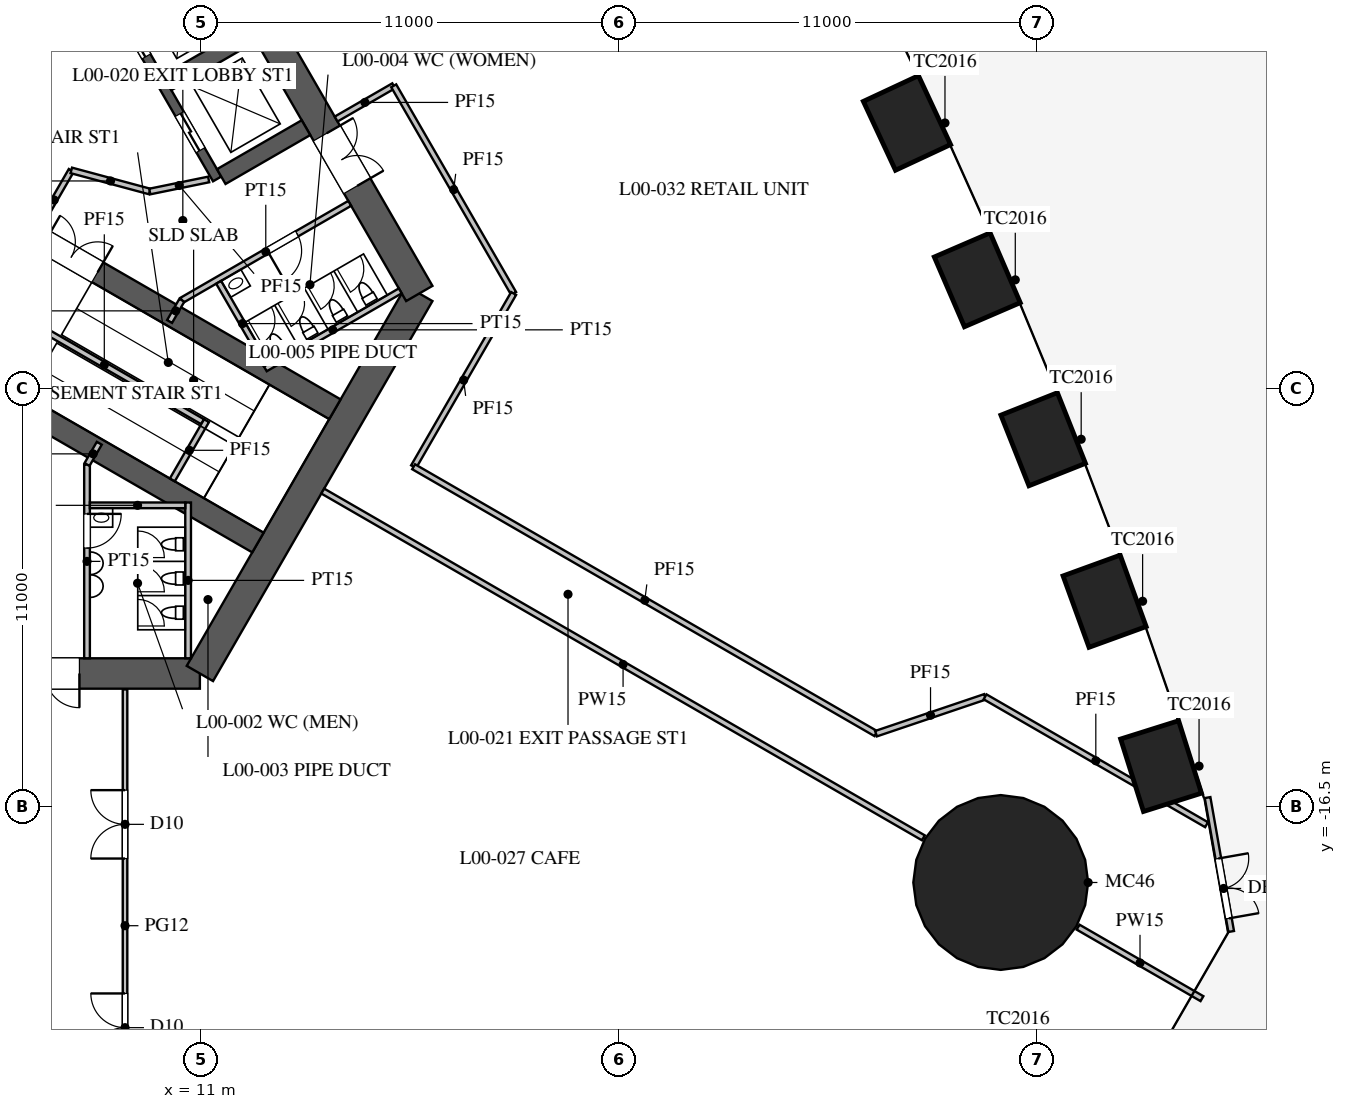
"""IFC4 building model, lengths in metres.
Left out: names, types, materials, properties, quantities, classifications, styles, units other than length and angle.
Written with IfcOpenShell. Run it as: python <this file> out.ifc"""

import sys

from ifc_helpers import new_model, si_unit, direction, frame, frame_2d, origin, origin_2d, place, context, subcontext, project, spatial, polyline, rectangle, circle, outline, extrude, element, fill, save


model = new_model("IFC4")
c1 = context("Model", 3, precision=1e-05, world=origin(), true_north=direction((0.0, 1.0)))
c2 = subcontext(c1, "Body", "Model", "MODEL_VIEW")
j1 = project(units=[si_unit("LENGTHUNIT", "METRE"), si_unit("PLANEANGLEUNIT", "RADIAN")], contexts=[c1])
p1 = place(None, origin())
s1 = spatial("IfcSite", under=j1, at=p1, CompositionType="ELEMENT")
p2 = place(p1, origin())
s2 = spatial("IfcBuilding", under=s1, at=p2, CompositionType="ELEMENT")
p3 = place(p2, origin())
s3 = spatial("IfcBuildingStorey", under=s2, at=p3, CompositionType="ELEMENT", Elevation=0.0)
for number, where, z_axis, x_axis in (
    (1, (36.262, -15.438, 0.0), (0.0, 0.0, 1.0), (-0.3, 0.954, 0.0)),
    (2, (34.776, -11.099, 0.0), (0.0, 0.0, 1.0), (-0.342, 0.94, 0.0)),
    (3, (33.16, -6.836, 0.0), (0.0, 0.0, 1.0), (-0.369, 0.929, 0.0)),
    (4, (31.426, -2.641, 0.0), (0.0, 0.0, 1.0), (-0.396, 0.918, 0.0)),
    (5, (29.576, 1.487, 0.0), (0.0, 0.0, 1.0), (-0.423, 0.906, 0.0)),
):
    element("IfcColumn", number, at=place(p3, frame(where, z_axis=z_axis, x_axis=x_axis)), inside=s3, PredefinedType="COLUMN", context=c2, shape_type="SweptSolid", body=[
        extrude(rectangle(XDim=2.0, YDim=1.6, at=origin_2d()), origin(), (0.0, 0.0, 1.0), 6.5),
    ])
p4 = place(p3, frame((32.043, -18.5, 0.0), z_axis=(0.0, 0.0, 1.0), x_axis=(1.0, 0.0, 0.0)))
e6 = element("IfcColumn", 6, at=p4, inside=s3, PredefinedType="COLUMN", context=c2, shape_type="SweptSolid", body=[
    extrude(circle(Radius=2.3, at=origin_2d()), origin(), (0.0, 0.0, 1.0), 6.5),
])
p5 = place(p3, frame((-10.97, -13.0, 0.0), z_axis=(0.0, 0.0, 1.0), x_axis=(1.0, 0.0, 0.0)))
e7 = element("IfcWall", 7, at=p5, inside=s3, PredefinedType="SHEAR", context=c2, shape_type="SweptSolid", body=[
    extrude(rectangle(XDim=21.939, YDim=0.8, at=frame_2d((10.97, 0.0))), origin(), (0.0, 0.0, 1.0), 6.5),
])
p6 = place(p5, frame((16.97, 0.0, 0.0)))
e8 = element("IfcOpeningElement", 8, at=p6, cuts=e7, PredefinedType="OPENING", context=c2, shape_type="SweptSolid", body=[
    extrude(rectangle(XDim=1.8, YDim=2.1, at=frame_2d((0.9, 1.05))), frame((0.0, 0.41, 0.0), z_axis=(0.0, -1.0, 0.0), x_axis=(1.0, 0.0, 0.0)), (0.0, 0.0, 1.0), 0.82),
])
p7 = place(p5, frame((3.27, 0.0, 0.0)))
e9 = element("IfcOpeningElement", 9, at=p7, cuts=e7, PredefinedType="OPENING", context=c2, shape_type="SweptSolid", body=[
    extrude(rectangle(XDim=1.6, YDim=2.1, at=frame_2d((0.8, 1.05))), frame((0.0, 0.41, 0.0), z_axis=(0.0, -1.0, 0.0), x_axis=(1.0, 0.0, 0.0)), (0.0, 0.0, 1.0), 0.82),
])
p8 = place(p3, frame((10.97, -13.0, 0.0), z_axis=(0.0, 0.0, 1.0), x_axis=(0.499995765644, 0.866027848477, 0.0)))
e10 = element("IfcWall", 10, at=p8, inside=s3, PredefinedType="SHEAR", context=c2, shape_type="SweptSolid", body=[
    extrude(rectangle(XDim=11.547, YDim=0.8, at=frame_2d((5.773, 0.0))), origin(), (0.0, 0.0, 1.0), 6.5),
])
p9 = place(p3, frame((16.743, -3.0, 0.0), z_axis=(0.0, 0.0, 1.0), x_axis=(-0.500002442456, 0.866023993627, 0.0)))
e11 = element("IfcWall", 11, at=p9, inside=s3, PredefinedType="SHEAR", context=c2, shape_type="SweptSolid", body=[
    extrude(rectangle(XDim=21.939, YDim=0.8, at=frame_2d((10.97, 0.0))), origin(), (0.0, 0.0, 1.0), 6.5),
])
p10 = place(p9, frame((17.27, 0.0, 0.0)))
e12 = element("IfcOpeningElement", 12, at=p10, cuts=e11, PredefinedType="OPENING", context=c2, shape_type="SweptSolid", body=[
    extrude(rectangle(XDim=1.2, YDim=2.1, at=frame_2d((0.6, 1.05))), frame((0.0, 0.41, 0.0), z_axis=(0.0, -1.0, 0.0), x_axis=(1.0, 0.0, 0.0)), (0.0, 0.0, 1.0), 0.82),
])
p11 = place(p9, frame((3.27, 0.0, 0.0)))
e13 = element("IfcOpeningElement", 13, at=p11, cuts=e11, PredefinedType="OPENING", context=c2, shape_type="SweptSolid", body=[
    extrude(rectangle(XDim=1.6, YDim=2.1, at=frame_2d((0.8, 1.05))), frame((0.0, 0.41, 0.0), z_axis=(0.0, -1.0, 0.0), x_axis=(1.0, 0.0, 0.0)), (0.0, 0.0, 1.0), 0.82),
])
p12 = place(p3, frame((11.424, 0.014, 0.0), z_axis=(0.0, 0.0, 1.0), x_axis=(-0.500001763848, 0.866024385424, 0.0)))
e14 = element("IfcWall", 14, at=p12, inside=s3, PredefinedType="SHEAR", context=c2, shape_type="SweptSolid", body=[
    extrude(rectangle(XDim=11.4, YDim=0.25, at=frame_2d((5.7, 0.0))), origin(), (0.0, 0.0, 1.0), 6.5),
])
p13 = place(p12, frame((0.875, 0.0, 0.0)))
e15 = element("IfcOpeningElement", 15, at=p13, cuts=e14, PredefinedType="OPENING", context=c2, shape_type="SweptSolid", body=[
    extrude(rectangle(XDim=1.1, YDim=2.2, at=frame_2d((0.55, 1.1))), frame((0.0, 0.135, 0.0), z_axis=(0.0, -1.0, 0.0), x_axis=(1.0, 0.0, 0.0)), (0.0, 0.0, 1.0), 0.27),
])
p14 = place(p12, frame((3.725, 0.0, 0.0)))
e16 = element("IfcOpeningElement", 16, at=p14, cuts=e14, PredefinedType="OPENING", context=c2, shape_type="SweptSolid", body=[
    extrude(rectangle(XDim=1.1, YDim=2.2, at=frame_2d((0.55, 1.1))), frame((0.0, 0.135, 0.0), z_axis=(0.0, -1.0, 0.0), x_axis=(1.0, 0.0, 0.0)), (0.0, 0.0, 1.0), 0.27),
])
p15 = place(p12, frame((6.575, 0.0, 0.0)))
e17 = element("IfcOpeningElement", 17, at=p15, cuts=e14, PredefinedType="OPENING", context=c2, shape_type="SweptSolid", body=[
    extrude(rectangle(XDim=1.1, YDim=2.2, at=frame_2d((0.55, 1.1))), frame((0.0, 0.135, 0.0), z_axis=(0.0, -1.0, 0.0), x_axis=(1.0, 0.0, 0.0)), (0.0, 0.0, 1.0), 0.27),
])
p16 = place(p12, frame((9.425, 0.0, 0.0)))
e18 = element("IfcOpeningElement", 18, at=p16, cuts=e14, PredefinedType="OPENING", context=c2, shape_type="SweptSolid", body=[
    extrude(rectangle(XDim=1.1, YDim=2.2, at=frame_2d((0.55, 1.1))), frame((0.0, 0.135, 0.0), z_axis=(0.0, -1.0, 0.0), x_axis=(1.0, 0.0, 0.0)), (0.0, 0.0, 1.0), 0.27),
])
for number, where, z_axis, x_axis in (
    (19, (11.532, 0.076, 0.0), (0.0, 0.0, 1.0), (0.866, 0.5, 0.0)),
    (20, (10.107, 2.544, 0.0), (0.0, 0.0, 1.0), (0.866, 0.5, 0.0)),
):
    element("IfcWall", number, at=place(p3, frame(where, z_axis=z_axis, x_axis=x_axis)), inside=s3, PredefinedType="SHEAR", context=c2, shape_type="SweptSolid", body=[
        extrude(rectangle(XDim=2.575, YDim=0.45, at=frame_2d((1.288, 0.0))), origin(), (0.0, 0.0, 1.0), 6.5),
    ])
p17 = place(p3, frame((4.638, -5.016, 0.0), z_axis=(0.0, 0.0, 1.0), x_axis=(0.866019375473, -0.500010441196, 0.0)))
e21 = element("IfcWall", 21, at=p17, inside=s3, PredefinedType="SHEAR", context=c2, shape_type="SweptSolid", body=[
    extrude(rectangle(XDim=9.075, YDim=0.6, at=frame_2d((4.538, 0.0))), origin(), (0.0, 0.0, 1.0), 6.5),
])
p18 = place(p3, frame((6.663, -1.509, 0.0), z_axis=(0.0, 0.0, 1.0), x_axis=(0.866019375473, -0.500010441196, 0.0)))
e22 = element("IfcWall", 22, at=p18, inside=s3, PredefinedType="SHEAR", context=c2, shape_type="SweptSolid", body=[
    extrude(rectangle(XDim=9.075, YDim=0.6, at=frame_2d((4.538, 0.0))), origin(), (0.0, 0.0, 1.0), 6.5),
])
p19 = place(p18, frame((0.265, 0.0, 0.0)))
e23 = element("IfcOpeningElement", 23, at=p19, cuts=e22, PredefinedType="OPENING", context=c2, shape_type="SweptSolid", body=[
    extrude(rectangle(XDim=1.6, YDim=2.1, at=frame_2d((0.8, 1.05))), frame((0.0, 0.31, 0.0), z_axis=(0.0, -1.0, 0.0), x_axis=(1.0, 0.0, 0.0)), (0.0, 0.0, 1.0), 0.62),
])
p20 = place(p3, frame((38.107, -19.79, 0.0), z_axis=(0.0, 0.0, 1.0), x_axis=(-0.173652987794, 0.984806904845, 0.0)))
e24 = element("IfcWall", 24, at=p20, inside=s3, PredefinedType="SOLIDWALL", context=c2, shape_type="SweptSolid", body=[
    extrude(rectangle(XDim=3.578, YDim=0.15, at=frame_2d((1.789, 0.0))), origin(), (0.0, 0.0, 1.0), 6.48),
])
p21 = place(p20, frame((0.35, 0.0, 0.0)))
e25 = element("IfcOpeningElement", 25, at=p21, cuts=e24, PredefinedType="OPENING", context=c2, shape_type="SweptSolid", body=[
    extrude(rectangle(XDim=1.6, YDim=2.4, at=frame_2d((0.8, 1.2))), frame((0.0, 0.085, 0.0), z_axis=(0.0, -1.0, 0.0), x_axis=(1.0, 0.0, 0.0)), (0.0, 0.0, 1.0), 0.17),
])
p22 = place(p3, frame((8.0, -7.5, 0.0), z_axis=(0.0, 0.0, 1.0), x_axis=(0.0, -1.0, 0.0)))
e26 = element("IfcWall", 26, at=p22, inside=s3, PredefinedType="PARTITIONING", context=c2, shape_type="SweptSolid", body=[
    extrude(rectangle(XDim=5.1, YDim=0.15, at=frame_2d((2.55, 0.0))), origin(), (0.0, 0.0, 1.0), 6.3),
])
p23 = place(p22, frame((1.3, 0.0, 0.0)))
e27 = element("IfcOpeningElement", 27, at=p23, cuts=e26, PredefinedType="OPENING", context=c2, shape_type="SweptSolid", body=[
    extrude(rectangle(XDim=0.9, YDim=2.1, at=frame_2d((0.45, 1.05))), frame((0.0, 0.085, 0.0), z_axis=(0.0, -1.0, 0.0), x_axis=(1.0, 0.0, 0.0)), (0.0, 0.0, 1.0), 0.17),
])
p24 = place(p3, frame((10.495, -3.178, 0.0), z_axis=(0.0, 0.0, 1.0), x_axis=(0.86602216432, 0.500005610874, 0.0)))
e28 = element("IfcWall", 28, at=p24, inside=s3, PredefinedType="PARTITIONING", context=c2, shape_type="SweptSolid", body=[
    extrude(rectangle(XDim=5.1, YDim=0.15, at=frame_2d((2.55, 0.0))), origin(), (0.0, 0.0, 1.0), 6.3),
])
p25 = place(p24, frame((2.6, 0.0, 0.0)))
e29 = element("IfcOpeningElement", 29, at=p25, cuts=e28, PredefinedType="OPENING", context=c2, shape_type="SweptSolid", body=[
    extrude(rectangle(XDim=0.9, YDim=2.1, at=frame_2d((0.45, 1.05))), frame((0.0, 0.085, 0.0), z_axis=(0.0, -1.0, 0.0), x_axis=(1.0, 0.0, 0.0)), (0.0, 0.0, 1.0), 0.17),
])
for number, where, z_axis, x_axis in (
    (30, (8.0, -7.5, 0.0), (0.0, 0.0, 1.0), (0.5, 0.866, 0.0)),
    (31, (10.495, -3.178, 0.0), (0.0, 0.0, 1.0), (-0.5, -0.866, 0.0)),
):
    element("IfcWall", number, at=place(p3, frame(where, z_axis=z_axis, x_axis=x_axis)), inside=s3, PredefinedType="PARTITIONING", context=c2, shape_type="SweptSolid", body=[
        extrude(rectangle(XDim=0.645, YDim=0.15, at=frame_2d((0.323, 0.0))), origin(), (0.0, 0.0, 1.0), 6.3),
    ])
p26 = place(p3, frame((10.66, -8.5, 0.0), z_axis=(0.0, 0.0, 1.0), x_axis=(0.0, -1.0, 0.0)))
e32 = element("IfcWall", 32, at=p26, inside=s3, PredefinedType="PARTITIONING", context=c2, shape_type="SweptSolid", body=[
    extrude(rectangle(XDim=4.1, YDim=0.15, at=frame_2d((2.05, 0.0))), origin(), (0.0, 0.0, 1.0), 6.3),
])
p27 = place(p3, frame((8.075, -8.575, 0.0), z_axis=(0.0, 0.0, 1.0), x_axis=(1.0, 0.0, 0.0)))
e33 = element("IfcWall", 33, at=p27, inside=s3, PredefinedType="PARTITIONING", context=c2, shape_type="SweptSolid", body=[
    extrude(rectangle(XDim=2.51, YDim=0.15, at=frame_2d((1.255, 0.0))), origin(), (0.0, 0.0, 1.0), 6.3),
])
p28 = place(p3, frame((12.691, -4.982, 0.0), z_axis=(0.0, 0.0, 1.0), x_axis=(0.8660249478, 0.500000789788, 0.0)))
e34 = element("IfcWall", 34, at=p28, inside=s3, PredefinedType="PARTITIONING", context=c2, shape_type="SweptSolid", body=[
    extrude(rectangle(XDim=4.1, YDim=0.15, at=frame_2d((2.05, 0.0))), origin(), (0.0, 0.0, 1.0), 6.3),
])
p29 = place(p3, frame((11.464, -2.706, 0.0), z_axis=(0.0, 0.0, 1.0), x_axis=(0.50001992892, -0.866013897511, 0.0)))
e35 = element("IfcWall", 35, at=p29, inside=s3, PredefinedType="PARTITIONING", context=c2, shape_type="SweptSolid", body=[
    extrude(rectangle(XDim=2.51, YDim=0.15, at=frame_2d((1.255, 0.0))), origin(), (0.0, 0.0, 1.0), 6.3),
])
p30 = place(p3, frame((14.203, -8.2, 0.0), z_axis=(0.0, 0.0, 1.0), x_axis=(0.866024965723, -0.500000758745, 0.0)))
e36 = element("IfcWall", 36, at=p30, inside=s3, PredefinedType="PARTITIONING", context=c2, shape_type="SweptSolid", body=[
    extrude(rectangle(XDim=18.25, YDim=0.15, at=frame_2d((9.125, 0.0))), origin(), (0.0, 0.0, 1.0), 4.6),
])
p31 = place(p3, frame((34.078, -19.675, 0.0), z_axis=(0.0, 0.0, 1.0), x_axis=(0.866019247219, -0.500010663332, 0.0)))
e37 = element("IfcWall", 37, at=p31, inside=s3, PredefinedType="PARTITIONING", context=c2, shape_type="SweptSolid", body=[
    extrude(rectangle(XDim=3.764, YDim=0.15, at=frame_2d((1.882, 0.0))), origin(), (0.0, 0.0, 1.0), 4.6),
])
p32 = place(p3, frame((9.0, -13.42, 0.0), z_axis=(0.0, 0.0, 1.0), x_axis=(0.0, -1.0, 0.0)))
e38 = element("IfcWall", 38, at=p32, inside=s3, PredefinedType="PARTITIONING", context=c2, shape_type="SweptSolid", body=[
    extrude(rectangle(XDim=12.435, YDim=0.12, at=frame_2d((6.217, 0.0))), origin(), (0.0, 0.0, 1.0), 5.0),
])
p33 = place(p32, frame((2.65, 0.0, 0.0)))
e39 = element("IfcOpeningElement", 39, at=p33, cuts=e38, PredefinedType="OPENING", context=c2, shape_type="SweptSolid", body=[
    extrude(rectangle(XDim=1.8, YDim=2.1, at=frame_2d((0.9, 1.05))), frame((0.0, 0.07, 0.0), z_axis=(0.0, -1.0, 0.0), x_axis=(1.0, 0.0, 0.0)), (0.0, 0.0, 1.0), 0.14),
])
p34 = place(p32, frame((8.0, 0.0, 0.0)))
e40 = element("IfcOpeningElement", 40, at=p34, cuts=e38, PredefinedType="OPENING", context=c2, shape_type="SweptSolid", body=[
    extrude(rectangle(XDim=1.8, YDim=2.1, at=frame_2d((0.9, 1.05))), frame((0.0, 0.07, 0.0), z_axis=(0.0, -1.0, 0.0), x_axis=(1.0, 0.0, 0.0)), (0.0, 0.0, 1.0), 0.14),
])
p35 = place(p3, frame((5.867, -3.387, 0.0), z_axis=(0.0, 0.0, 1.0), x_axis=(0.866014108153, -0.500019564097, 0.0)))
e41 = element("IfcWall", 41, at=p35, inside=s3, PredefinedType="PARTITIONING", context=c2, shape_type="SweptSolid", body=[
    extrude(outline(polyline([(0.0, 0.0), (5.975, 0.0), (5.975, 4.014), (1.966, 6.3), (0.0, 6.3), (0.0, 0.0)])), frame((0.0, 0.075, 0.0), z_axis=(0.0, -1.0, 0.0), x_axis=(1.0, 0.0, 0.0)), (0.0, 0.0, 1.0), 0.15),
])
p36 = place(p3, frame((10.244, -7.906, 0.0), z_axis=(0.0, 0.0, 1.0), x_axis=(0.499961193289, 0.866047807691, 0.0)))
e42 = element("IfcWall", 42, at=p36, inside=s3, PredefinedType="PARTITIONING", context=c2, shape_type="SweptSolid", body=[
    extrude(rectangle(XDim=1.8, YDim=0.15, at=frame_2d((0.9, 0.0))), origin(), (0.0, 0.0, 1.0), 3.575),
])
p37 = place(p3, frame((6.686, -1.32, 0.0), z_axis=(0.0, 0.0, 1.0), x_axis=(0.500062916607, 0.865989075817, 0.0)))
e43 = element("IfcWall", 43, at=p37, inside=s3, PredefinedType="PARTITIONING", context=c2, shape_type="SweptSolid", body=[
    extrude(rectangle(XDim=1.8, YDim=0.15, at=frame_2d((0.9, 0.0))), origin(), (0.0, 0.0, 1.0), 6.3),
])
p38 = place(p3, frame((7.586, 0.239, 0.0), z_axis=(0.0, 0.0, 1.0), x_axis=(0.965664233544, -0.259793356447, 0.0)))
e44 = element("IfcWall", 44, at=p38, inside=s3, PredefinedType="PARTITIONING", context=c2, shape_type="SweptSolid", body=[
    extrude(rectangle(XDim=2.139, YDim=0.15, at=frame_2d((1.069, 0.0))), origin(), (0.0, 0.0, 1.0), 6.3),
])
p39 = place(p3, frame((9.651, -0.317, 0.0), z_axis=(0.0, 0.0, 1.0), x_axis=(0.979710109184, 0.200419814298, 0.0)))
e45 = element("IfcWall", 45, at=p39, inside=s3, PredefinedType="PARTITIONING", context=c2, shape_type="SweptSolid", body=[
    extrude(rectangle(XDim=1.581, YDim=0.15, at=frame_2d((0.791, 0.0))), origin(), (0.0, 0.0, 1.0), 6.3),
])
p40 = place(p3, frame((14.555, 1.59, 0.0), z_axis=(0.0, 0.0, 1.0), x_axis=(0.866036909293, 0.499980071345, 0.0)))
e46 = element("IfcWall", 46, at=p40, inside=s3, PredefinedType="PARTITIONING", context=c2, shape_type="SweptSolid", body=[
    extrude(rectangle(XDim=1.75, YDim=0.15, at=frame_2d((0.875, 0.0))), origin(), (0.0, 0.0, 1.0), 6.3),
])
p41 = place(p3, frame((16.07, 2.465, 0.0), z_axis=(0.0, 0.0, 1.0), x_axis=(0.500012675527, -0.866018085442, 0.0)))
e47 = element("IfcWall", 47, at=p41, inside=s3, PredefinedType="PARTITIONING", context=c2, shape_type="SweptSolid", body=[
    extrude(rectangle(XDim=6.311, YDim=0.15, at=frame_2d((3.155, 0.0))), origin(), (0.0, 0.0, 1.0), 6.3),
])
p42 = place(p3, frame((19.226, -3.0, 0.0), z_axis=(0.0, 0.0, 1.0), x_axis=(-0.500014132739, -0.86601724409, 0.0)))
e48 = element("IfcWall", 48, at=p42, inside=s3, PredefinedType="PARTITIONING", context=c2, shape_type="SweptSolid", body=[
    extrude(rectangle(XDim=5.265, YDim=0.15, at=frame_2d((2.632, 0.0))), origin(), (0.0, 0.0, 1.0), 6.3),
])
p43 = place(p3, frame((16.593, -7.56, 0.0), z_axis=(0.0, 0.0, 1.0), x_axis=(0.86602961784, -0.499992700971, 0.0)))
e49 = element("IfcWall", 49, at=p43, inside=s3, PredefinedType="PARTITIONING", context=c2, shape_type="SweptSolid", body=[
    extrude(rectangle(XDim=14.05, YDim=0.15, at=frame_2d((7.025, 0.0))), origin(), (0.0, 0.0, 1.0), 6.3),
])
p44 = place(p3, frame((28.761, -14.584, 0.0), z_axis=(0.0, 0.0, 1.0), x_axis=(0.947320595797, 0.32028688512, 0.0)))
e50 = element("IfcWall", 50, at=p44, inside=s3, PredefinedType="PARTITIONING", context=c2, shape_type="SweptSolid", body=[
    extrude(rectangle(XDim=3.029, YDim=0.15, at=frame_2d((1.515, 0.0))), origin(), (0.0, 0.0, 1.0), 5.7),
])
p45 = place(p3, frame((31.631, -13.614, 0.0), z_axis=(0.0, 0.0, 1.0), x_axis=(0.866020068361, -0.500009241111, 0.0)))
e51 = element("IfcWall", 51, at=p45, inside=s3, PredefinedType="PARTITIONING", context=c2, shape_type="SweptSolid", body=[
    extrude(rectangle(XDim=6.73, YDim=0.15, at=frame_2d((3.365, 0.0))), origin(), (0.0, 0.0, 1.0), 6.3),
])
p46 = place(p21, frame((1.6, 0.0, 0.0), z_axis=(0.0, 0.0, 1.0), x_axis=(-1.0, 0.0, 0.0)))
e52 = element("IfcDoor", 52, at=p46, inside=s3, OperationType="DOUBLE_DOOR_SINGLE_SWING", PredefinedType="DOOR", context=c2, shape_type="SweptSolid", body=[
    extrude(rectangle(XDim=1.6, YDim=2.4, at=frame_2d((0.8, 1.2))), frame((0.0, 0.025, 0.0), z_axis=(0.0, -1.0, 0.0), x_axis=(1.0, 0.0, 0.0)), (0.0, 0.0, 1.0), 0.05),
])
fill(e25, e52)
p47 = place(p23, origin())
e53 = element("IfcDoor", 53, at=p47, inside=s3, OperationType="SINGLE_SWING_LEFT", PredefinedType="DOOR", context=c2, shape_type="SweptSolid", body=[
    extrude(rectangle(XDim=0.9, YDim=2.1, at=frame_2d((0.45, 1.05))), frame((0.0, 0.025, 0.0), z_axis=(0.0, -1.0, 0.0), x_axis=(1.0, 0.0, 0.0)), (0.0, 0.0, 1.0), 0.05),
])
fill(e27, e53)
p48 = place(p25, frame((0.9, 0.0, 0.0), z_axis=(0.0, 0.0, 1.0), x_axis=(-1.0, 0.0, 0.0)))
e54 = element("IfcDoor", 54, at=p48, inside=s3, OperationType="SINGLE_SWING_RIGHT", PredefinedType="DOOR", context=c2, shape_type="SweptSolid", body=[
    extrude(rectangle(XDim=0.9, YDim=2.1, at=frame_2d((0.45, 1.05))), frame((0.0, 0.025, 0.0), z_axis=(0.0, -1.0, 0.0), x_axis=(1.0, 0.0, 0.0)), (0.0, 0.0, 1.0), 0.05),
])
fill(e29, e54)
p49 = place(p6, frame((1.8, 0.0, 0.0), z_axis=(0.0, 0.0, 1.0), x_axis=(-1.0, 0.0, 0.0)))
e55 = element("IfcDoor", 55, at=p49, inside=s3, OperationType="DOUBLE_DOOR_SINGLE_SWING", PredefinedType="DOOR", context=c2, shape_type="SweptSolid", body=[
    extrude(rectangle(XDim=1.8, YDim=2.1, at=frame_2d((0.9, 1.05))), frame((0.0, 0.025, 0.0), z_axis=(0.0, -1.0, 0.0), x_axis=(1.0, 0.0, 0.0)), (0.0, 0.0, 1.0), 0.05),
])
fill(e8, e55)
p50 = place(p11, frame((1.6, 0.0, 0.0), z_axis=(0.0, 0.0, 1.0), x_axis=(-1.0, 0.0, 0.0)))
e56 = element("IfcDoor", 56, at=p50, inside=s3, OperationType="DOUBLE_DOOR_SINGLE_SWING", PredefinedType="DOOR", context=c2, shape_type="SweptSolid", body=[
    extrude(rectangle(XDim=1.6, YDim=2.1, at=frame_2d((0.8, 1.05))), frame((0.0, 0.025, 0.0), z_axis=(0.0, -1.0, 0.0), x_axis=(1.0, 0.0, 0.0)), (0.0, 0.0, 1.0), 0.05),
])
fill(e13, e56)
p51 = place(p33, frame((1.8, 0.0, 0.0), z_axis=(0.0, 0.0, 1.0), x_axis=(-1.0, 0.0, 0.0)))
e57 = element("IfcDoor", 57, at=p51, inside=s3, OperationType="DOUBLE_DOOR_SINGLE_SWING", PredefinedType="DOOR", context=c2, shape_type="SweptSolid", body=[
    extrude(rectangle(XDim=1.8, YDim=2.1, at=frame_2d((0.9, 1.05))), frame((0.0, 0.025, 0.0), z_axis=(0.0, -1.0, 0.0), x_axis=(1.0, 0.0, 0.0)), (0.0, 0.0, 1.0), 0.05),
])
fill(e39, e57)
p52 = place(p34, frame((1.8, 0.0, 0.0), z_axis=(0.0, 0.0, 1.0), x_axis=(-1.0, 0.0, 0.0)))
e58 = element("IfcDoor", 58, at=p52, inside=s3, OperationType="DOUBLE_DOOR_SINGLE_SWING", PredefinedType="DOOR", context=c2, shape_type="SweptSolid", body=[
    extrude(rectangle(XDim=1.8, YDim=2.1, at=frame_2d((0.9, 1.05))), frame((0.0, 0.025, 0.0), z_axis=(0.0, -1.0, 0.0), x_axis=(1.0, 0.0, 0.0)), (0.0, 0.0, 1.0), 0.05),
])
fill(e40, e58)
p53 = place(p19, origin())
e59 = element("IfcDoor", 59, at=p53, inside=s3, OperationType="DOUBLE_DOOR_SINGLE_SWING", PredefinedType="DOOR", context=c2, shape_type="SweptSolid", body=[
    extrude(rectangle(XDim=1.6, YDim=2.1, at=frame_2d((0.8, 1.05))), frame((0.0, 0.025, 0.0), z_axis=(0.0, -1.0, 0.0), x_axis=(1.0, 0.0, 0.0)), (0.0, 0.0, 1.0), 0.05),
])
fill(e23, e59)
p54 = place(p13, origin())
e60 = element("IfcDoor", 60, at=p54, inside=s3, OperationType="DOUBLE_DOOR_SLIDING", PredefinedType="DOOR", context=c2, shape_type="SweptSolid", body=[
    extrude(rectangle(XDim=1.1, YDim=2.2, at=frame_2d((0.55, 1.1))), frame((0.0, 0.025, 0.0), z_axis=(0.0, -1.0, 0.0), x_axis=(1.0, 0.0, 0.0)), (0.0, 0.0, 1.0), 0.05),
])
fill(e15, e60)
p55 = place(p14, origin())
e61 = element("IfcDoor", 61, at=p55, inside=s3, OperationType="DOUBLE_DOOR_SLIDING", PredefinedType="DOOR", context=c2, shape_type="SweptSolid", body=[
    extrude(rectangle(XDim=1.1, YDim=2.2, at=frame_2d((0.55, 1.1))), frame((0.0, 0.025, 0.0), z_axis=(0.0, -1.0, 0.0), x_axis=(1.0, 0.0, 0.0)), (0.0, 0.0, 1.0), 0.05),
])
fill(e16, e61)
save(model, sys.argv[1])
